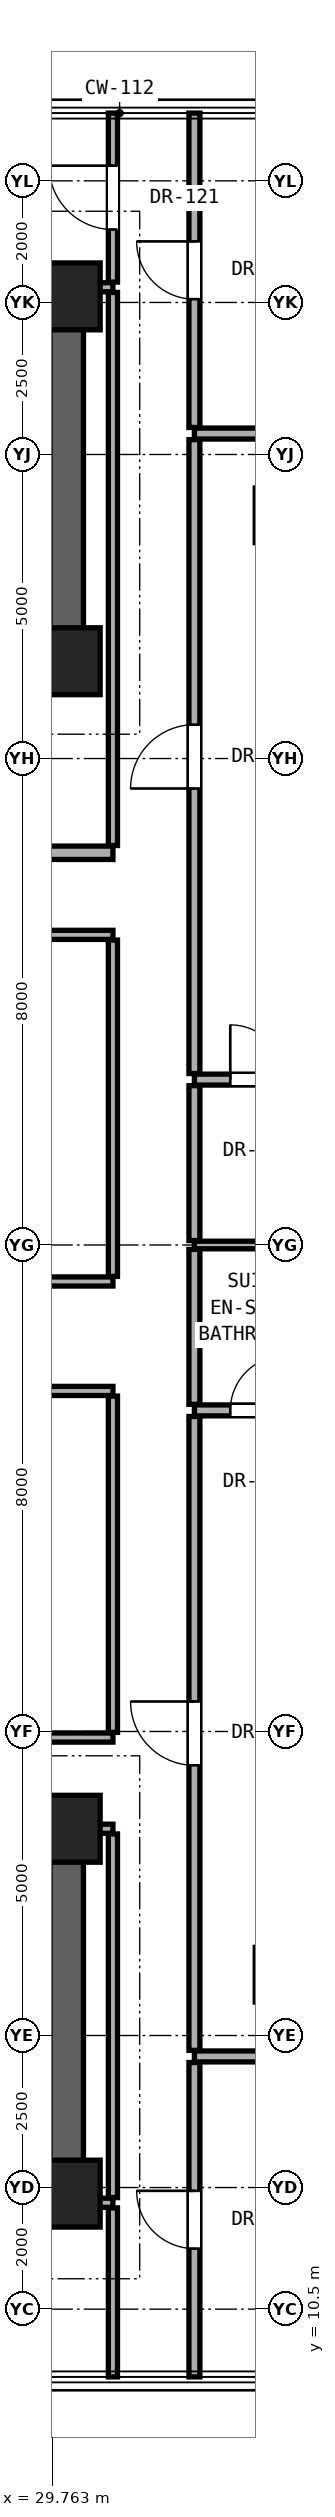
"""IFC4 building model, lengths in metres.
Left out: names, types, materials, properties, quantities, classifications, styles, units other than length and angle.
Written with IfcOpenShell. Run it as: python <this file> out.ifc"""

import sys

from ifc_helpers import new_model, si_unit, direction, frame, frame_2d, origin, origin_2d, place, context, subcontext, project, spatial, rectangle, extrude, element, fill, save


model = new_model("IFC4")
c1 = context("Model", 3, precision=1e-05, world=origin(), true_north=direction((0.0, 1.0)))
c2 = subcontext(c1, "Body", "Model", "MODEL_VIEW")
j1 = project(units=[si_unit("LENGTHUNIT", "METRE"), si_unit("PLANEANGLEUNIT", "RADIAN")], contexts=[c1])
p1 = place(None, origin())
s1 = spatial("IfcSite", under=j1, at=p1, CompositionType="ELEMENT")
p2 = place(p1, origin())
s2 = spatial("IfcBuilding", under=s1, at=p2, CompositionType="ELEMENT")
p3 = place(p2, frame((0.0, 0.0, 128.0)))
s3 = spatial("IfcBuildingStorey", under=s2, at=p3, CompositionType="ELEMENT", Elevation=128.0)
for number, where, z_axis, x_axis in (
    (1, (30.0, 12.4, 0.0), (0.0, 0.0, 1.0), (1.0, 0.0, 0.0)),
    (2, (30.0, 18.4, 0.0), (0.0, 0.0, 1.0), (1.0, 0.0, 0.0)),
    (3, (30.0, 37.6, 0.0), (0.0, 0.0, 1.0), (1.0, 0.0, 0.0)),
    (4, (30.0, 43.6, 0.0), (0.0, 0.0, 1.0), (1.0, 0.0, 0.0)),
):
    element("IfcColumn", number, at=place(p3, frame(where, z_axis=z_axis, x_axis=x_axis)), inside=s3, PredefinedType="COLUMN", context=c2, shape_type="SweptSolid", body=[
        extrude(rectangle(XDim=1.1, YDim=1.1, at=origin_2d()), origin(), (0.0, 0.0, 1.0), 3.3),
    ])
for number, where, z_axis, x_axis in (
    (5, (33.4, 16.0, 0.0), (0.0, 0.0, 1.0), (1.0, 0.0, 0.0)),
    (6, (33.4, 40.0, 0.0), (0.0, 0.0, 1.0), (1.0, 0.0, 0.0)),
):
    element("IfcColumn", number, at=place(p3, frame(where, z_axis=z_axis, x_axis=x_axis)), inside=s3, PredefinedType="PILASTER", context=c2, shape_type="SweptSolid", body=[
        extrude(rectangle(XDim=0.6, YDim=0.9, at=origin_2d()), origin(), (0.0, 0.0, 1.0), 3.3),
    ])
p4 = place(p3, frame((11.0, 43.6, 0.0), z_axis=(0.0, 0.0, 1.0), x_axis=(1.0, 0.0, 0.0)))
e7 = element("IfcWall", 7, at=p4, inside=s3, PredefinedType="SHEAR", context=c2, shape_type="SweptSolid", body=[
    extrude(rectangle(XDim=19.0, YDim=0.55, at=frame_2d((9.5, 0.0))), origin(), (0.0, 0.0, 1.0), 3.08),
])
p5 = place(p3, frame((30.0, 37.6, 0.0), z_axis=(0.0, 0.0, 1.0), x_axis=(0.0, 1.0, 0.0)))
e8 = element("IfcWall", 8, at=p5, inside=s3, PredefinedType="SHEAR", context=c2, shape_type="SweptSolid", body=[
    extrude(rectangle(XDim=6.0, YDim=0.55, at=frame_2d((3.0, 0.0))), origin(), (0.0, 0.0, 1.0), 3.08),
])
p6 = place(p3, frame((11.0, 37.6, 0.0), z_axis=(0.0, 0.0, 1.0), x_axis=(1.0, 0.0, 0.0)))
e9 = element("IfcWall", 9, at=p6, inside=s3, PredefinedType="SHEAR", context=c2, shape_type="SweptSolid", body=[
    extrude(rectangle(XDim=19.0, YDim=0.55, at=frame_2d((9.5, 0.0))), origin(), (0.0, 0.0, 1.0), 3.08),
])
p7 = place(p6, frame((1.06, 0.0, 0.0)))
e10 = element("IfcOpeningElement", 10, at=p7, cuts=e9, PredefinedType="OPENING", context=c2, shape_type="SweptSolid", body=[
    extrude(rectangle(XDim=1.15, YDim=2.2, at=frame_2d((0.575, 1.1))), frame((0.0, 0.285, 0.0), z_axis=(0.0, -1.0, 0.0), x_axis=(1.0, 0.0, 0.0)), (0.0, 0.0, 1.0), 0.57),
])
p8 = place(p6, frame((9.55, 0.0, 0.0)))
e11 = element("IfcOpeningElement", 11, at=p8, cuts=e9, PredefinedType="OPENING", context=c2, shape_type="SweptSolid", body=[
    extrude(rectangle(XDim=1.4, YDim=2.35, at=frame_2d((0.7, 1.175))), frame((0.0, 0.285, 0.0), z_axis=(0.0, -1.0, 0.0), x_axis=(1.0, 0.0, 0.0)), (0.0, 0.0, 1.0), 0.57),
])
p9 = place(p6, frame((11.95, 0.0, 0.0)))
e12 = element("IfcOpeningElement", 12, at=p9, cuts=e9, PredefinedType="OPENING", context=c2, shape_type="SweptSolid", body=[
    extrude(rectangle(XDim=1.4, YDim=2.35, at=frame_2d((0.7, 1.175))), frame((0.0, 0.285, 0.0), z_axis=(0.0, -1.0, 0.0), x_axis=(1.0, 0.0, 0.0)), (0.0, 0.0, 1.0), 0.57),
])
p10 = place(p3, frame((11.0, 12.4, 0.0), z_axis=(0.0, 0.0, 1.0), x_axis=(1.0, 0.0, 0.0)))
e13 = element("IfcWall", 13, at=p10, inside=s3, PredefinedType="SHEAR", context=c2, shape_type="SweptSolid", body=[
    extrude(rectangle(XDim=19.0, YDim=0.55, at=frame_2d((9.5, 0.0))), origin(), (0.0, 0.0, 1.0), 3.08),
])
p11 = place(p3, frame((30.0, 12.4, 0.0), z_axis=(0.0, 0.0, 1.0), x_axis=(0.0, 1.0, 0.0)))
e14 = element("IfcWall", 14, at=p11, inside=s3, PredefinedType="SHEAR", context=c2, shape_type="SweptSolid", body=[
    extrude(rectangle(XDim=6.0, YDim=0.55, at=frame_2d((3.0, 0.0))), origin(), (0.0, 0.0, 1.0), 3.08),
])
p12 = place(p3, frame((11.0, 18.4, 0.0), z_axis=(0.0, 0.0, 1.0), x_axis=(1.0, 0.0, 0.0)))
e15 = element("IfcWall", 15, at=p12, inside=s3, PredefinedType="SHEAR", context=c2, shape_type="SweptSolid", body=[
    extrude(rectangle(XDim=19.0, YDim=0.55, at=frame_2d((9.5, 0.0))), origin(), (0.0, 0.0, 1.0), 3.08),
])
p13 = place(p12, frame((4.175, 0.0, 0.0)))
e16 = element("IfcOpeningElement", 16, at=p13, cuts=e15, PredefinedType="OPENING", context=c2, shape_type="SweptSolid", body=[
    extrude(rectangle(XDim=1.2, YDim=2.25, at=frame_2d((0.6, 1.125))), frame((0.0, 0.285, 0.0), z_axis=(0.0, -1.0, 0.0), x_axis=(1.0, 0.0, 0.0)), (0.0, 0.0, 1.0), 0.57),
])
p14 = place(p12, frame((9.6, 0.0, 0.0)))
e17 = element("IfcOpeningElement", 17, at=p14, cuts=e15, PredefinedType="OPENING", context=c2, shape_type="SweptSolid", body=[
    extrude(rectangle(XDim=1.3, YDim=2.3, at=frame_2d((0.65, 1.15))), frame((0.0, 0.285, 0.0), z_axis=(0.0, -1.0, 0.0), x_axis=(1.0, 0.0, 0.0)), (0.0, 0.0, 1.0), 0.57),
])
p15 = place(p12, frame((11.9, 0.0, 0.0)))
e18 = element("IfcOpeningElement", 18, at=p15, cuts=e15, PredefinedType="OPENING", context=c2, shape_type="SweptSolid", body=[
    extrude(rectangle(XDim=1.3, YDim=2.3, at=frame_2d((0.65, 1.15))), frame((0.0, 0.285, 0.0), z_axis=(0.0, -1.0, 0.0), x_axis=(1.0, 0.0, 0.0)), (0.0, 0.0, 1.0), 0.57),
])
p16 = place(p12, frame((14.3, 0.0, 0.0)))
e19 = element("IfcOpeningElement", 19, at=p16, cuts=e15, PredefinedType="OPENING", context=c2, shape_type="SweptSolid", body=[
    extrude(rectangle(XDim=1.3, YDim=2.3, at=frame_2d((0.65, 1.15))), frame((0.0, 0.285, 0.0), z_axis=(0.0, -1.0, 0.0), x_axis=(1.0, 0.0, 0.0)), (0.0, 0.0, 1.0), 0.57),
])
p17 = place(p12, frame((16.6, 0.0, 0.0)))
e20 = element("IfcOpeningElement", 20, at=p17, cuts=e15, PredefinedType="OPENING", context=c2, shape_type="SweptSolid", body=[
    extrude(rectangle(XDim=1.3, YDim=2.3, at=frame_2d((0.65, 1.15))), frame((0.0, 0.285, 0.0), z_axis=(0.0, -1.0, 0.0), x_axis=(1.0, 0.0, 0.0)), (0.0, 0.0, 1.0), 0.57),
])
p18 = place(p3, frame((30.27, 12.25, 0.0), z_axis=(0.0, 0.0, 1.0), x_axis=(1.0, 0.0, 0.0)))
e21 = element("IfcWall", 21, at=p18, inside=s3, PredefinedType="PARTITIONING", context=c2, shape_type="SweptSolid", body=[
    extrude(rectangle(XDim=0.49, YDim=0.15, at=frame_2d((0.245, 0.0))), origin(), (0.0, 0.0, 1.0), 3.08),
])
p19 = place(p3, frame((32.1, 14.656, 0.0), z_axis=(0.0, 0.0, 1.0), x_axis=(1.0, 0.0, 0.0)))
e22 = element("IfcWall", 22, at=p19, inside=s3, PredefinedType="PARTITIONING", context=c2, shape_type="SweptSolid", body=[
    extrude(rectangle(XDim=3.83, YDim=0.18, at=frame_2d((1.915, 0.0))), origin(), (0.0, 0.0, 1.0), 3.08),
])
p20 = place(p3, frame((30.27, 18.4, 0.0), z_axis=(0.0, 0.0, 1.0), x_axis=(1.0, 0.0, 0.0)))
e23 = element("IfcWall", 23, at=p20, inside=s3, PredefinedType="PARTITIONING", context=c2, shape_type="SweptSolid", body=[
    extrude(rectangle(XDim=0.49, YDim=0.15, at=frame_2d((0.245, 0.0))), origin(), (0.0, 0.0, 1.0), 2.456),
])
p21 = place(p3, frame((21.44, 19.9, 0.0), z_axis=(0.0, 0.0, 1.0), x_axis=(1.0, 0.0, 0.0)))
e24 = element("IfcWall", 24, at=p21, inside=s3, PredefinedType="PARTITIONING", context=c2, shape_type="SweptSolid", body=[
    extrude(rectangle(XDim=9.32, YDim=0.15, at=frame_2d((4.66, 0.0))), origin(), (0.0, 0.0, 1.0), 2.216),
])
p22 = place(p21, frame((4.185, 0.0, 0.0)))
e25 = element("IfcOpeningElement", 25, at=p22, cuts=e24, PredefinedType="OPENING", context=c2, shape_type="SweptSolid", body=[
    extrude(rectangle(XDim=0.95, YDim=2.15, at=frame_2d((0.475, 1.075))), frame((0.0, 0.085, 0.0), z_axis=(0.0, -1.0, 0.0), x_axis=(1.0, 0.0, 0.0)), (0.0, 0.0, 1.0), 0.17),
])
p23 = place(p3, frame((32.1, 25.28, 0.0), z_axis=(0.0, 0.0, 1.0), x_axis=(1.0, 0.0, 0.0)))
e26 = element("IfcWall", 26, at=p23, inside=s3, PredefinedType="PARTITIONING", context=c2, shape_type="SweptSolid", body=[
    extrude(rectangle(XDim=9.12, YDim=0.18, at=frame_2d((4.56, 0.0))), origin(), (0.0, 0.0, 1.0), 2.299),
])
p24 = place(p23, frame((5.085, 0.0, 0.0)))
e27 = element("IfcOpeningElement", 27, at=p24, cuts=e26, PredefinedType="OPENING", context=c2, shape_type="SweptSolid", body=[
    extrude(rectangle(XDim=0.95, YDim=2.15, at=frame_2d((0.475, 1.075))), frame((0.0, 0.1, 0.0), z_axis=(0.0, -1.0, 0.0), x_axis=(1.0, 0.0, 0.0)), (0.0, 0.0, 1.0), 0.2),
])
p25 = place(p23, frame((0.59, 0.0, 0.0)))
e28 = element("IfcOpeningElement", 28, at=p25, cuts=e26, PredefinedType="OPENING", context=c2, shape_type="SweptSolid", body=[
    extrude(rectangle(XDim=0.9, YDim=2.1, at=frame_2d((0.45, 1.05))), frame((0.0, 0.1, 0.0), z_axis=(0.0, -1.0, 0.0), x_axis=(1.0, 0.0, 0.0)), (0.0, 0.0, 1.0), 0.2),
])
for number, where, z_axis, x_axis in (
    (29, (21.4, 25.6, 0.0), (0.0, 0.0, 1.0), (1.0, 0.0, 0.0)),
    (30, (21.4, 27.4, 0.0), (0.0, 0.0, 1.0), (1.0, 0.0, 0.0)),
):
    element("IfcWall", number, at=place(p3, frame(where, z_axis=z_axis, x_axis=x_axis)), inside=s3, PredefinedType="PARTITIONING", context=c2, shape_type="SweptSolid", body=[
        extrude(rectangle(XDim=9.36, YDim=0.15, at=frame_2d((4.68, 0.0))), origin(), (0.0, 0.0, 1.0), 2.216),
    ])
p26 = place(p3, frame((32.1, 28.0, 0.0), z_axis=(0.0, 0.0, 1.0), x_axis=(1.0, 0.0, 0.0)))
e31 = element("IfcWall", 31, at=p26, inside=s3, PredefinedType="PARTITIONING", context=c2, shape_type="SweptSolid", body=[
    extrude(rectangle(XDim=9.12, YDim=0.125, at=frame_2d((4.56, 0.0))), origin(), (0.0, 0.0, 1.0), 2.299),
])
p27 = place(p3, frame((32.1, 30.72, 0.0), z_axis=(0.0, 0.0, 1.0), x_axis=(1.0, 0.0, 0.0)))
e32 = element("IfcWall", 32, at=p27, inside=s3, PredefinedType="PARTITIONING", context=c2, shape_type="SweptSolid", body=[
    extrude(rectangle(XDim=9.12, YDim=0.18, at=frame_2d((4.56, 0.0))), origin(), (0.0, 0.0, 1.0), 2.299),
])
p28 = place(p27, frame((5.085, 0.0, 0.0)))
e33 = element("IfcOpeningElement", 33, at=p28, cuts=e32, PredefinedType="OPENING", context=c2, shape_type="SweptSolid", body=[
    extrude(rectangle(XDim=0.95, YDim=2.15, at=frame_2d((0.475, 1.075))), frame((0.0, 0.1, 0.0), z_axis=(0.0, -1.0, 0.0), x_axis=(1.0, 0.0, 0.0)), (0.0, 0.0, 1.0), 0.2),
])
p29 = place(p27, frame((0.59, 0.0, 0.0)))
e34 = element("IfcOpeningElement", 34, at=p29, cuts=e32, PredefinedType="OPENING", context=c2, shape_type="SweptSolid", body=[
    extrude(rectangle(XDim=0.9, YDim=2.1, at=frame_2d((0.45, 1.05))), frame((0.0, 0.1, 0.0), z_axis=(0.0, -1.0, 0.0), x_axis=(1.0, 0.0, 0.0)), (0.0, 0.0, 1.0), 0.2),
])
p30 = place(p3, frame((21.44, 33.1, 0.0), z_axis=(0.0, 0.0, 1.0), x_axis=(1.0, 0.0, 0.0)))
e35 = element("IfcWall", 35, at=p30, inside=s3, PredefinedType="PARTITIONING", context=c2, shape_type="SweptSolid", body=[
    extrude(rectangle(XDim=9.32, YDim=0.15, at=frame_2d((4.66, 0.0))), origin(), (0.0, 0.0, 1.0), 2.216),
])
p31 = place(p30, frame((4.185, 0.0, 0.0)))
e36 = element("IfcOpeningElement", 36, at=p31, cuts=e35, PredefinedType="OPENING", context=c2, shape_type="SweptSolid", body=[
    extrude(rectangle(XDim=0.95, YDim=2.15, at=frame_2d((0.475, 1.075))), frame((0.0, 0.085, 0.0), z_axis=(0.0, -1.0, 0.0), x_axis=(1.0, 0.0, 0.0)), (0.0, 0.0, 1.0), 0.17),
])
p32 = place(p3, frame((15.59, 34.45, 0.0), z_axis=(0.0, 0.0, 1.0), x_axis=(1.0, 0.0, 0.0)))
e37 = element("IfcWall", 37, at=p32, inside=s3, PredefinedType="SOLIDWALL", context=c2, shape_type="SweptSolid", body=[
    extrude(rectangle(XDim=15.17, YDim=0.22, at=frame_2d((7.585, 0.0))), origin(), (0.0, 0.0, 1.0), 2.216),
])
p33 = place(p32, frame((6.435, 0.0, 0.0)))
e38 = element("IfcOpeningElement", 38, at=p33, cuts=e37, PredefinedType="OPENING", context=c2, shape_type="SweptSolid", body=[
    extrude(rectangle(XDim=0.85, YDim=2.01, at=frame_2d((0.425, 1.005))), frame((0.0, 0.12, 0.0), z_axis=(0.0, -1.0, 0.0), x_axis=(1.0, 0.0, 0.0)), (0.0, 0.0, 1.0), 0.24),
])
p34 = place(p32, frame((11.085, 0.0, 0.0)))
e39 = element("IfcOpeningElement", 39, at=p34, cuts=e37, PredefinedType="OPENING", context=c2, shape_type="SweptSolid", body=[
    extrude(rectangle(XDim=0.95, YDim=2.15, at=frame_2d((0.475, 1.075))), frame((0.0, 0.12, 0.0), z_axis=(0.0, -1.0, 0.0), x_axis=(1.0, 0.0, 0.0)), (0.0, 0.0, 1.0), 0.24),
])
p35 = place(p32, frame((1.775, 0.0, 0.0)))
e40 = element("IfcOpeningElement", 40, at=p35, cuts=e37, PredefinedType="OPENING", context=c2, shape_type="SweptSolid", body=[
    extrude(rectangle(XDim=0.85, YDim=2.01, at=frame_2d((0.425, 1.005))), frame((0.0, 0.12, 0.0), z_axis=(0.0, -1.0, 0.0), x_axis=(1.0, 0.0, 0.0)), (0.0, 0.0, 1.0), 0.24),
])
p36 = place(p3, frame((32.1, 41.344, 0.0), z_axis=(0.0, 0.0, 1.0), x_axis=(1.0, 0.0, 0.0)))
e41 = element("IfcWall", 41, at=p36, inside=s3, PredefinedType="PARTITIONING", context=c2, shape_type="SweptSolid", body=[
    extrude(rectangle(XDim=3.83, YDim=0.18, at=frame_2d((1.915, 0.0))), origin(), (0.0, 0.0, 1.0), 3.08),
])
p37 = place(p3, frame((30.27, 43.75, 0.0), z_axis=(0.0, 0.0, 1.0), x_axis=(1.0, 0.0, 0.0)))
e42 = element("IfcWall", 42, at=p37, inside=s3, PredefinedType="PARTITIONING", context=c2, shape_type="SweptSolid", body=[
    extrude(rectangle(XDim=0.49, YDim=0.15, at=frame_2d((0.245, 0.0))), origin(), (0.0, 0.0, 1.0), 3.08),
])
p38 = place(p3, frame((30.76, 9.386, 0.0), z_axis=(0.0, 0.0, 1.0), x_axis=(0.0, 1.0, 0.0)))
e43 = element("IfcWall", 43, at=p38, inside=s3, PredefinedType="PARTITIONING", context=c2, shape_type="SweptSolid", body=[
    extrude(rectangle(XDim=2.779, YDim=0.15, at=frame_2d((1.39, 0.0))), origin(), (0.0, 0.0, 1.0), 3.08),
])
p39 = place(p3, frame((30.76, 12.335, 0.0), z_axis=(0.0, 0.0, 1.0), x_axis=(0.0, 1.0, 0.0)))
e44 = element("IfcWall", 44, at=p39, inside=s3, PredefinedType="PARTITIONING", context=c2, shape_type="SweptSolid", body=[
    extrude(rectangle(XDim=5.98, YDim=0.15, at=frame_2d((2.99, 0.0))), origin(), (0.0, 0.0, 1.0), 2.456),
])
for number, where, z_axis, x_axis in (
    (45, (30.76, 19.985, 0.0), (0.0, 0.0, 1.0), (0.0, 1.0, 0.0)),
    (46, (30.76, 27.485, 0.0), (0.0, 0.0, 1.0), (0.0, 1.0, 0.0)),
):
    element("IfcWall", number, at=place(p3, frame(where, z_axis=z_axis, x_axis=x_axis)), inside=s3, PredefinedType="PARTITIONING", context=c2, shape_type="SweptSolid", body=[
        extrude(rectangle(XDim=5.53, YDim=0.15, at=frame_2d((2.765, 0.0))), origin(), (0.0, 0.0, 1.0), 2.299),
    ])
p40 = place(p3, frame((30.76, 34.57, 0.0), z_axis=(0.0, 0.0, 1.0), x_axis=(0.0, 1.0, 0.0)))
e47 = element("IfcWall", 47, at=p40, inside=s3, PredefinedType="PARTITIONING", context=c2, shape_type="SweptSolid", body=[
    extrude(rectangle(XDim=9.095, YDim=0.15, at=frame_2d((4.547, 0.0))), origin(), (0.0, 0.0, 1.0), 2.456),
])
p41 = place(p3, frame((30.76, 43.835, 0.0), z_axis=(0.0, 0.0, 1.0), x_axis=(0.0, 1.0, 0.0)))
e48 = element("IfcWall", 48, at=p41, inside=s3, PredefinedType="PARTITIONING", context=c2, shape_type="SweptSolid", body=[
    extrude(rectangle(XDim=2.779, YDim=0.15, at=frame_2d((1.39, 0.0))), origin(), (0.0, 0.0, 1.0), 3.08),
])
p42 = place(p41, frame((0.865, 0.0, 0.0)))
e49 = element("IfcOpeningElement", 49, at=p42, cuts=e48, PredefinedType="OPENING", context=c2, shape_type="SweptSolid", body=[
    extrude(rectangle(XDim=1.05, YDim=2.2, at=frame_2d((0.525, 1.1))), frame((0.0, 0.085, 0.0), z_axis=(0.0, -1.0, 0.0), x_axis=(1.0, 0.0, 0.0)), (0.0, 0.0, 1.0), 0.17),
])
p43 = place(p3, frame((32.1, 9.386, 0.0), z_axis=(0.0, 0.0, 1.0), x_axis=(0.0, 1.0, 0.0)))
e50 = element("IfcWall", 50, at=p43, inside=s3, PredefinedType="PARTITIONING", context=c2, shape_type="SweptSolid", body=[
    extrude(rectangle(XDim=5.17, YDim=0.18, at=frame_2d((2.585, 0.0))), origin(), (0.0, 0.0, 1.0), 3.08),
])
p44 = place(p43, frame((2.11, 0.0, 0.0)))
e51 = element("IfcOpeningElement", 51, at=p44, cuts=e50, PredefinedType="OPENING", context=c2, shape_type="SweptSolid", body=[
    extrude(rectangle(XDim=0.95, YDim=2.15, at=frame_2d((0.475, 1.075))), frame((0.0, 0.1, 0.0), z_axis=(0.0, -1.0, 0.0), x_axis=(1.0, 0.0, 0.0)), (0.0, 0.0, 1.0), 0.2),
])
p45 = place(p3, frame((32.1, 14.756, 0.0), z_axis=(0.0, 0.0, 1.0), x_axis=(0.0, 1.0, 0.0)))
e52 = element("IfcWall", 52, at=p45, inside=s3, PredefinedType="PARTITIONING", context=c2, shape_type="SweptSolid", body=[
    extrude(rectangle(XDim=10.424, YDim=0.18, at=frame_2d((5.212, 0.0))), origin(), (0.0, 0.0, 1.0), 2.299),
])
p46 = place(p45, frame((4.687, 0.0, 0.0)))
e53 = element("IfcOpeningElement", 53, at=p46, cuts=e52, PredefinedType="OPENING", context=c2, shape_type="SweptSolid", body=[
    extrude(rectangle(XDim=1.05, YDim=2.2, at=frame_2d((0.525, 1.1))), frame((0.0, 0.1, 0.0), z_axis=(0.0, -1.0, 0.0), x_axis=(1.0, 0.0, 0.0)), (0.0, 0.0, 1.0), 0.2),
])
for number, where, z_axis, x_axis in (
    (54, (32.1, 25.38, 0.0), (0.0, 0.0, 1.0), (0.0, 1.0, 0.0)),
    (55, (32.1, 28.073, 0.0), (0.0, 0.0, 1.0), (0.0, 1.0, 0.0)),
):
    element("IfcWall", number, at=place(p3, frame(where, z_axis=z_axis, x_axis=x_axis)), inside=s3, PredefinedType="PARTITIONING", context=c2, shape_type="SweptSolid", body=[
        extrude(rectangle(XDim=2.548, YDim=0.18, at=frame_2d((1.274, 0.0))), origin(), (0.0, 0.0, 1.0), 3.08),
    ])
p47 = place(p3, frame((32.1, 30.82, 0.0), z_axis=(0.0, 0.0, 1.0), x_axis=(0.0, 1.0, 0.0)))
e56 = element("IfcWall", 56, at=p47, inside=s3, PredefinedType="PARTITIONING", context=c2, shape_type="SweptSolid", body=[
    extrude(rectangle(XDim=10.424, YDim=0.18, at=frame_2d((5.212, 0.0))), origin(), (0.0, 0.0, 1.0), 2.299),
])
p48 = place(p47, frame((4.687, 0.0, 0.0)))
e57 = element("IfcOpeningElement", 57, at=p48, cuts=e56, PredefinedType="OPENING", context=c2, shape_type="SweptSolid", body=[
    extrude(rectangle(XDim=1.05, YDim=2.2, at=frame_2d((0.525, 1.1))), frame((0.0, 0.1, 0.0), z_axis=(0.0, -1.0, 0.0), x_axis=(1.0, 0.0, 0.0)), (0.0, 0.0, 1.0), 0.2),
])
p49 = place(p3, frame((32.1, 41.444, 0.0), z_axis=(0.0, 0.0, 1.0), x_axis=(0.0, 1.0, 0.0)))
e58 = element("IfcWall", 58, at=p49, inside=s3, PredefinedType="PARTITIONING", context=c2, shape_type="SweptSolid", body=[
    extrude(rectangle(XDim=5.17, YDim=0.18, at=frame_2d((2.585, 0.0))), origin(), (0.0, 0.0, 1.0), 3.08),
])
p50 = place(p49, frame((2.11, 0.0, 0.0)))
e59 = element("IfcOpeningElement", 59, at=p50, cuts=e58, PredefinedType="OPENING", context=c2, shape_type="SweptSolid", body=[
    extrude(rectangle(XDim=0.95, YDim=2.15, at=frame_2d((0.475, 1.075))), frame((0.0, 0.1, 0.0), z_axis=(0.0, -1.0, 0.0), x_axis=(1.0, 0.0, 0.0)), (0.0, 0.0, 1.0), 0.2),
])
p51 = place(p46, origin())
e60 = element("IfcDoor", 60, at=p51, inside=s3, OperationType="SINGLE_SWING_RIGHT", PredefinedType="DOOR", context=c2, shape_type="SweptSolid", body=[
    extrude(rectangle(XDim=1.05, YDim=2.2, at=frame_2d((0.525, 1.1))), frame((0.0, 0.025, 0.0), z_axis=(0.0, -1.0, 0.0), x_axis=(1.0, 0.0, 0.0)), (0.0, 0.0, 1.0), 0.05),
])
fill(e53, e60)
p52 = place(p25, origin())
e61 = element("IfcDoor", 61, at=p52, inside=s3, OperationType="SINGLE_SWING_RIGHT", PredefinedType="DOOR", context=c2, shape_type="SweptSolid", body=[
    extrude(rectangle(XDim=0.9, YDim=2.1, at=frame_2d((0.45, 1.05))), frame((0.0, 0.025, 0.0), z_axis=(0.0, -1.0, 0.0), x_axis=(1.0, 0.0, 0.0)), (0.0, 0.0, 1.0), 0.05),
])
fill(e28, e61)
p53 = place(p48, origin())
e62 = element("IfcDoor", 62, at=p53, inside=s3, OperationType="SINGLE_SWING_LEFT", PredefinedType="DOOR", context=c2, shape_type="SweptSolid", body=[
    extrude(rectangle(XDim=1.05, YDim=2.2, at=frame_2d((0.525, 1.1))), frame((0.0, 0.025, 0.0), z_axis=(0.0, -1.0, 0.0), x_axis=(1.0, 0.0, 0.0)), (0.0, 0.0, 1.0), 0.05),
])
fill(e57, e62)
p54 = place(p29, origin())
e63 = element("IfcDoor", 63, at=p54, inside=s3, OperationType="SINGLE_SWING_LEFT", PredefinedType="DOOR", context=c2, shape_type="SweptSolid", body=[
    extrude(rectangle(XDim=0.9, YDim=2.1, at=frame_2d((0.45, 1.05))), frame((0.0, 0.025, 0.0), z_axis=(0.0, -1.0, 0.0), x_axis=(1.0, 0.0, 0.0)), (0.0, 0.0, 1.0), 0.05),
])
fill(e34, e63)
p55 = place(p44, origin())
e64 = element("IfcDoor", 64, at=p55, inside=s3, OperationType="SINGLE_SWING_RIGHT", PredefinedType="DOOR", context=c2, shape_type="SweptSolid", body=[
    extrude(rectangle(XDim=0.95, YDim=2.15, at=frame_2d((0.475, 1.075))), frame((0.0, 0.025, 0.0), z_axis=(0.0, -1.0, 0.0), x_axis=(1.0, 0.0, 0.0)), (0.0, 0.0, 1.0), 0.05),
])
fill(e51, e64)
p56 = place(p42, origin())
e65 = element("IfcDoor", 65, at=p56, inside=s3, OperationType="SINGLE_SWING_RIGHT", PredefinedType="DOOR", context=c2, shape_type="SweptSolid", body=[
    extrude(rectangle(XDim=1.05, YDim=2.2, at=frame_2d((0.525, 1.1))), frame((0.0, 0.025, 0.0), z_axis=(0.0, -1.0, 0.0), x_axis=(1.0, 0.0, 0.0)), (0.0, 0.0, 1.0), 0.05),
])
fill(e49, e65)
p57 = place(p50, origin())
e66 = element("IfcDoor", 66, at=p57, inside=s3, OperationType="SINGLE_SWING_RIGHT", PredefinedType="DOOR", context=c2, shape_type="SweptSolid", body=[
    extrude(rectangle(XDim=0.95, YDim=2.15, at=frame_2d((0.475, 1.075))), frame((0.0, 0.025, 0.0), z_axis=(0.0, -1.0, 0.0), x_axis=(1.0, 0.0, 0.0)), (0.0, 0.0, 1.0), 0.05),
])
fill(e59, e66)
save(model, sys.argv[1])
